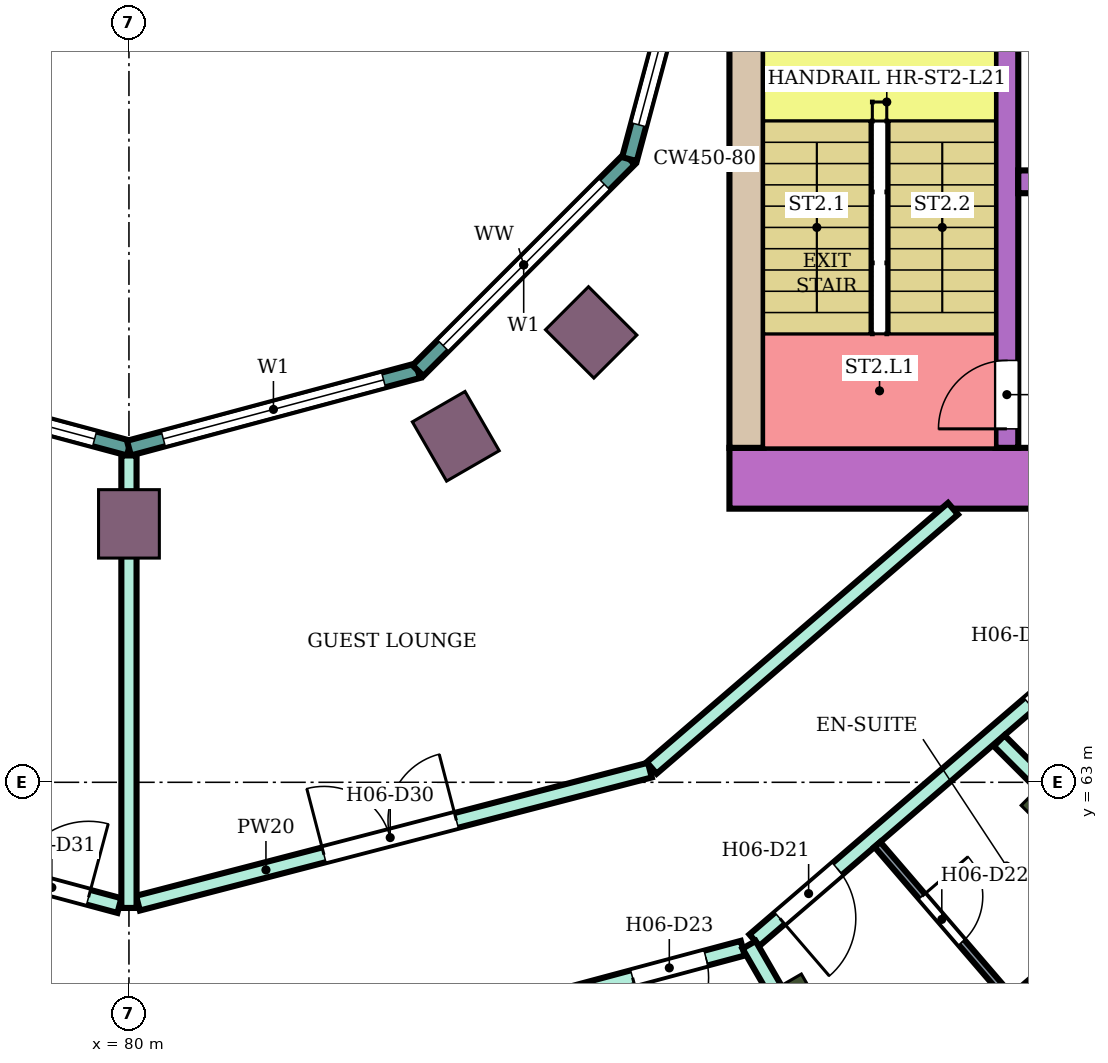
"""IFC4 building model, lengths in metres.
Left out: names, types, materials, properties, quantities, classifications, styles, units other than length and angle.
Written with IfcOpenShell. Run it as: python <this file> out.ifc"""

import sys

from ifc_helpers import new_model, si_unit, direction, frame, frame_2d, origin, origin_2d, place, context, subcontext, project, spatial, rectangle, extrude, element, fill, save


model = new_model("IFC4")
c1 = context("Model", 3, precision=1e-05, world=origin(), true_north=direction((0.0, 1.0)))
c2 = subcontext(c1, "Body", "Model", "MODEL_VIEW")
j1 = project(units=[si_unit("LENGTHUNIT", "METRE"), si_unit("PLANEANGLEUNIT", "RADIAN")], contexts=[c1])
p1 = place(None, origin())
s1 = spatial("IfcSite", under=j1, at=p1, CompositionType="ELEMENT")
p2 = place(p1, origin())
s2 = spatial("IfcBuilding", under=s1, at=p2, CompositionType="ELEMENT")
p3 = place(p2, frame((0.0, 0.0, 93.8)))
s3 = spatial("IfcBuildingStorey", under=s2, at=p3, CompositionType="ELEMENT", Elevation=93.8)
for number, where, z_axis, x_axis in (
    (1, (88.8, 59.758, 0.0), (0.0, 0.0, 1.0), (0.5, -0.866, 0.0)),
    (2, (92.445, 62.555, 0.0), (0.0, 0.0, 1.0), (0.707, -0.707, 0.0)),
):
    element("IfcColumn", number, at=place(p3, frame(where, z_axis=z_axis, x_axis=x_axis)), inside=s3, PredefinedType="COLUMN", context=c2, shape_type="SweptSolid", body=[
        extrude(rectangle(XDim=1.2, YDim=0.8, at=origin_2d()), origin(), (0.0, 0.0, 1.0), 3.8),
    ])
for number, where, z_axis, x_axis in (
    (3, (80.0, 66.4, 0.0), (0.0, 0.0, 1.0), (0.0, -1.0, 0.0)),
    (4, (84.3, 67.552, 0.0), (0.0, 0.0, 1.0), (0.5, -0.866, 0.0)),
    (5, (86.081, 68.919, 0.0), (0.0, 0.0, 1.0), (0.707, -0.707, 0.0)),
):
    element("IfcColumn", number, at=place(p3, frame(where, z_axis=z_axis, x_axis=x_axis)), inside=s3, PredefinedType="COLUMN", context=c2, shape_type="SweptSolid", body=[
        extrude(rectangle(XDim=0.9, YDim=0.8, at=origin_2d()), origin(), (0.0, 0.0, 1.0), 3.8),
    ])
p4 = place(p3, frame((87.9, 67.0, 0.0), z_axis=(0.0, 0.0, 1.0), x_axis=(1.0, 0.0, 0.0)))
e6 = element("IfcWall", 6, at=p4, inside=s3, PredefinedType="SHEAR", context=c2, shape_type="SweptSolid", body=[
    extrude(rectangle(XDim=14.7, YDim=0.8, at=frame_2d((7.35, 0.0))), origin(), (0.0, 0.0, 1.0), 3.48),
])
p5 = place(p4, frame((4.2, 0.0, 0.0)))
e7 = element("IfcOpeningElement", 7, at=p5, cuts=e6, PredefinedType="OPENING", context=c2, shape_type="SweptSolid", body=[
    extrude(rectangle(XDim=2.4, YDim=2.4, at=frame_2d((1.2, 1.2))), frame((0.0, 0.41, 0.0), z_axis=(0.0, -1.0, 0.0), x_axis=(1.0, 0.0, 0.0)), (0.0, 0.0, 1.0), 0.82),
])
p6 = place(p3, frame((88.125, 67.4, 0.0), z_axis=(0.0, 0.0, 1.0), x_axis=(0.0, 1.0, 0.0)))
e8 = element("IfcWall", 8, at=p6, inside=s3, PredefinedType="SHEAR", context=c2, shape_type="SweptSolid", body=[
    extrude(rectangle(XDim=7.6, YDim=0.45, at=frame_2d((3.8, 0.0))), origin(), (0.0, 0.0, 1.0), 3.48),
])
p7 = place(p3, frame((91.55, 67.4, 0.0), z_axis=(0.0, 0.0, 1.0), x_axis=(0.0, 1.0, 0.0)))
e9 = element("IfcWall", 9, at=p7, inside=s3, PredefinedType="SHEAR", context=c2, shape_type="SweptSolid", body=[
    extrude(rectangle(XDim=7.6, YDim=0.3, at=frame_2d((3.8, 0.0))), origin(), (0.0, 0.0, 1.0), 3.48),
])
p8 = place(p7, frame((0.25, 0.0, 0.0)))
e10 = element("IfcOpeningElement", 10, at=p8, cuts=e9, PredefinedType="OPENING", context=c2, shape_type="SweptSolid", body=[
    extrude(rectangle(XDim=0.9, YDim=2.1, at=frame_2d((0.45, 1.05))), frame((0.0, 0.16, 0.0), z_axis=(0.0, -1.0, 0.0), x_axis=(1.0, 0.0, 0.0)), (0.0, 0.0, 1.0), 0.32),
])
p9 = place(p3, frame((91.7, 70.9, 0.0), z_axis=(0.0, 0.0, 1.0), x_axis=(1.0, 0.0, 0.0)))
e11 = element("IfcWall", 11, at=p9, inside=s3, PredefinedType="SHEAR", context=c2, shape_type="SweptSolid", body=[
    extrude(rectangle(XDim=10.9, YDim=0.3, at=frame_2d((5.45, 0.0))), origin(), (0.0, 0.0, 1.0), 3.48),
])
p10 = place(p9, frame((0.4, 0.0, 0.0)))
e12 = element("IfcOpeningElement", 12, at=p10, cuts=e11, PredefinedType="OPENING", context=c2, shape_type="SweptSolid", body=[
    extrude(rectangle(XDim=1.4, YDim=2.1, at=frame_2d((0.7, 1.05))), frame((0.0, 0.16, 0.0), z_axis=(0.0, -1.0, 0.0), x_axis=(1.0, 0.0, 0.0)), (0.0, 0.0, 1.0), 0.32),
])
p11 = place(p9, frame((5.4, 0.0, 0.0)))
e13 = element("IfcOpeningElement", 13, at=p11, cuts=e11, PredefinedType="OPENING", context=c2, shape_type="SweptSolid", body=[
    extrude(rectangle(XDim=1.4, YDim=2.1, at=frame_2d((0.7, 1.05))), frame((0.0, 0.16, 0.0), z_axis=(0.0, -1.0, 0.0), x_axis=(1.0, 0.0, 0.0)), (0.0, 0.0, 1.0), 0.32),
])
p12 = place(p9, frame((8.1, 0.0, 0.0)))
e14 = element("IfcOpeningElement", 14, at=p12, cuts=e11, PredefinedType="OPENING", context=c2, shape_type="SweptSolid", body=[
    extrude(rectangle(XDim=1.0, YDim=2.1, at=frame_2d((0.5, 1.05))), frame((0.0, 0.16, 0.0), z_axis=(0.0, -1.0, 0.0), x_axis=(1.0, 0.0, 0.0)), (0.0, 0.0, 1.0), 0.32),
])
p13 = place(p3, frame((76.198, 68.415, 0.0), z_axis=(0.0, 0.0, 1.0), x_axis=(0.965933654434, -0.258789828301, 0.0)))
e15 = element("IfcWall", 15, at=p13, inside=s3, PredefinedType="NOTDEFINED", context=c2, shape_type="SweptSolid", body=[
    extrude(rectangle(XDim=3.936, YDim=0.2, at=frame_2d((1.968, 0.0))), origin(), (0.0, 0.0, 1.0), 3.8),
])
p14 = place(p13, frame((0.468, 0.0, 0.9)))
e16 = element("IfcOpeningElement", 16, at=p14, cuts=e15, PredefinedType="OPENING", context=c2, shape_type="SweptSolid", body=[
    extrude(rectangle(XDim=3.0, YDim=2.3, at=frame_2d((1.5, 1.15))), frame((0.0, 0.11, 0.0), z_axis=(0.0, -1.0, 0.0), x_axis=(1.0, 0.0, 0.0)), (0.0, 0.0, 1.0), 0.22),
])
p15 = place(p3, frame((80.0, 67.396, 0.0), z_axis=(0.0, 0.0, 1.0), x_axis=(0.965933654434, 0.258789828301, 0.0)))
e17 = element("IfcWall", 17, at=p15, inside=s3, PredefinedType="NOTDEFINED", context=c2, shape_type="SweptSolid", body=[
    extrude(rectangle(XDim=3.936, YDim=0.2, at=frame_2d((1.968, 0.0))), origin(), (0.0, 0.0, 1.0), 3.8),
])
p16 = place(p15, frame((0.468, 0.0, 0.9)))
e18 = element("IfcOpeningElement", 18, at=p16, cuts=e17, PredefinedType="OPENING", context=c2, shape_type="SweptSolid", body=[
    extrude(rectangle(XDim=3.0, YDim=2.3, at=frame_2d((1.5, 1.15))), frame((0.0, 0.11, 0.0), z_axis=(0.0, -1.0, 0.0), x_axis=(1.0, 0.0, 0.0)), (0.0, 0.0, 1.0), 0.22),
])
p17 = place(p3, frame((83.802, 68.415, 0.0), z_axis=(0.0, 0.0, 1.0), x_axis=(0.707106781187, 0.707106781187, 0.0)))
e19 = element("IfcWall", 19, at=p17, inside=s3, PredefinedType="NOTDEFINED", context=c2, shape_type="SweptSolid", body=[
    extrude(rectangle(XDim=3.936, YDim=0.2, at=frame_2d((1.968, 0.0))), origin(), (0.0, 0.0, 1.0), 3.8),
])
p18 = place(p17, frame((0.468, 0.0, 0.9)))
e20 = element("IfcOpeningElement", 20, at=p18, cuts=e19, PredefinedType="OPENING", context=c2, shape_type="SweptSolid", body=[
    extrude(rectangle(XDim=3.0, YDim=2.3, at=frame_2d((1.5, 1.15))), frame((0.0, 0.11, 0.0), z_axis=(0.0, -1.0, 0.0), x_axis=(1.0, 0.0, 0.0)), (0.0, 0.0, 1.0), 0.22),
])
p19 = place(p3, frame((86.585, 71.198, 0.0), z_axis=(0.0, 0.0, 1.0), x_axis=(0.258789828301, 0.965933654434, 0.0)))
e21 = element("IfcWall", 21, at=p19, inside=s3, PredefinedType="NOTDEFINED", context=c2, shape_type="SweptSolid", body=[
    extrude(rectangle(XDim=3.936, YDim=0.2, at=frame_2d((1.968, 0.0))), origin(), (0.0, 0.0, 1.0), 3.8),
])
p20 = place(p19, frame((0.468, 0.0, 0.9)))
e22 = element("IfcOpeningElement", 22, at=p20, cuts=e21, PredefinedType="OPENING", context=c2, shape_type="SweptSolid", body=[
    extrude(rectangle(XDim=3.0, YDim=2.3, at=frame_2d((1.5, 1.15))), frame((0.0, 0.11, 0.0), z_axis=(0.0, -1.0, 0.0), x_axis=(1.0, 0.0, 0.0)), (0.0, 0.0, 1.0), 0.22),
])
p21 = place(p3, frame((71.877, 60.831, 0.0), z_axis=(0.0, 0.0, 1.0), x_axis=(0.965905026676, -0.258896657842, 0.0)))
e23 = element("IfcWall", 23, at=p21, inside=s3, PredefinedType="PARTITIONING", context=c2, shape_type="SweptSolid", body=[
    extrude(rectangle(XDim=8.36, YDim=0.2, at=frame_2d((4.18, 0.0))), origin(), (0.0, 0.0, 1.0), 3.35),
])
p22 = place(p21, frame((4.655, 0.0, 0.0)))
e24 = element("IfcOpeningElement", 24, at=p22, cuts=e23, PredefinedType="OPENING", context=c2, shape_type="SweptSolid", body=[
    extrude(rectangle(XDim=1.8, YDim=2.1, at=frame_2d((0.9, 1.05))), frame((0.0, 0.11, 0.0), z_axis=(0.0, -1.0, 0.0), x_axis=(1.0, 0.0, 0.0)), (0.0, 0.0, 1.0), 0.22),
])
p23 = place(p3, frame((73.297, 63.143, 0.0), z_axis=(0.0, 0.0, 1.0), x_axis=(0.965859030528, -0.25906820173, 0.0)))
e25 = element("IfcWall", 25, at=p23, inside=s3, PredefinedType="PARTITIONING", context=c2, shape_type="SweptSolid", body=[
    extrude(rectangle(XDim=6.81, YDim=0.2, at=frame_2d((3.405, 0.0))), origin(), (0.0, 0.0, 1.0), 3.35),
])
p24 = place(p23, frame((5.39, 0.0, 0.0)))
e26 = element("IfcOpeningElement", 26, at=p24, cuts=e25, PredefinedType="OPENING", context=c2, shape_type="SweptSolid", body=[
    extrude(rectangle(XDim=1.0, YDim=2.1, at=frame_2d((0.5, 1.05))), frame((0.0, 0.11, 0.0), z_axis=(0.0, -1.0, 0.0), x_axis=(1.0, 0.0, 0.0)), (0.0, 0.0, 1.0), 0.22),
])
p25 = place(p3, frame((80.119, 61.41, 0.0), z_axis=(0.0, 0.0, 1.0), x_axis=(0.967823361235, 0.251630565408, 0.0)))
e27 = element("IfcWall", 27, at=p25, inside=s3, PredefinedType="PARTITIONING", context=c2, shape_type="SweptSolid", body=[
    extrude(rectangle(XDim=6.958, YDim=0.2, at=frame_2d((3.479, 0.0))), origin(), (0.0, 0.0, 1.0), 3.35),
])
p26 = place(p25, frame((2.529, 0.0, 0.0)))
e28 = element("IfcOpeningElement", 28, at=p26, cuts=e27, PredefinedType="OPENING", context=c2, shape_type="SweptSolid", body=[
    extrude(rectangle(XDim=1.8, YDim=2.1, at=frame_2d((0.9, 1.05))), frame((0.0, 0.11, 0.0), z_axis=(0.0, -1.0, 0.0), x_axis=(1.0, 0.0, 0.0)), (0.0, 0.0, 1.0), 0.22),
])
p27 = place(p3, frame((80.0, 58.655, 0.0), z_axis=(0.0, 0.0, 1.0), x_axis=(0.965967338894, 0.258664068224, 0.0)))
e29 = element("IfcWall", 29, at=p27, inside=s3, PredefinedType="PARTITIONING", context=c2, shape_type="SweptSolid", body=[
    extrude(rectangle(XDim=8.36, YDim=0.2, at=frame_2d((4.18, 0.0))), origin(), (0.0, 0.0, 1.0), 3.35),
])
p28 = place(p27, frame((6.86, 0.0, 0.0)))
e30 = element("IfcOpeningElement", 30, at=p28, cuts=e29, PredefinedType="OPENING", context=c2, shape_type="SweptSolid", body=[
    extrude(rectangle(XDim=1.0, YDim=2.1, at=frame_2d((0.5, 1.05))), frame((0.0, 0.11, 0.0), z_axis=(0.0, -1.0, 0.0), x_axis=(1.0, 0.0, 0.0)), (0.0, 0.0, 1.0), 0.22),
])
p29 = place(p3, frame((80.0, 61.347, 0.0), z_axis=(0.0, 0.0, 1.0), x_axis=(0.0, 1.0, 0.0)))
e31 = element("IfcWall", 31, at=p29, inside=s3, PredefinedType="PARTITIONING", context=c2, shape_type="SweptSolid", body=[
    extrude(rectangle(XDim=5.953, YDim=0.2, at=frame_2d((2.977, 0.0))), origin(), (0.0, 0.0, 1.0), 3.35),
])
p30 = place(p3, frame((86.877, 63.189, 0.0), z_axis=(0.0, 0.0, 1.0), x_axis=(0.758088707506, 0.652151448325, 0.0)))
e32 = element("IfcWall", 32, at=p30, inside=s3, PredefinedType="PARTITIONING", context=c2, shape_type="SweptSolid", body=[
    extrude(rectangle(XDim=5.229, YDim=0.2, at=frame_2d((2.615, 0.0))), origin(), (0.0, 0.0, 1.0), 3.35),
])
p31 = place(p3, frame((88.229, 60.923, 0.0), z_axis=(0.0, 0.0, 1.0), x_axis=(0.758220952094, 0.651997690031, 0.0)))
e33 = element("IfcWall", 33, at=p31, inside=s3, PredefinedType="PARTITIONING", context=c2, shape_type="SweptSolid", body=[
    extrude(rectangle(XDim=6.346, YDim=0.2, at=frame_2d((3.173, 0.0))), origin(), (0.0, 0.0, 1.0), 3.35),
])
p32 = place(p31, frame((4.767, 0.0, 0.0)))
e34 = element("IfcOpeningElement", 34, at=p32, cuts=e33, PredefinedType="OPENING", context=c2, shape_type="SweptSolid", body=[
    extrude(rectangle(XDim=1.0, YDim=2.1, at=frame_2d((0.5, 1.05))), frame((0.0, 0.11, 0.0), z_axis=(0.0, -1.0, 0.0), x_axis=(1.0, 0.0, 0.0)), (0.0, 0.0, 1.0), 0.22),
])
p33 = place(p31, frame((0.44, 0.0, 0.0)))
e35 = element("IfcOpeningElement", 35, at=p33, cuts=e33, PredefinedType="OPENING", context=c2, shape_type="SweptSolid", body=[
    extrude(rectangle(XDim=1.0, YDim=2.1, at=frame_2d((0.5, 1.05))), frame((0.0, 0.11, 0.0), z_axis=(0.0, -1.0, 0.0), x_axis=(1.0, 0.0, 0.0)), (0.0, 0.0, 1.0), 0.22),
])
p34 = place(p3, frame((88.158, 60.862, 0.0), z_axis=(0.0, 0.0, 1.0), x_axis=(0.499916512745, -0.866073599808, 0.0)))
e36 = element("IfcWall", 36, at=p34, inside=s3, PredefinedType="PARTITIONING", context=c2, shape_type="SweptSolid", body=[
    extrude(rectangle(XDim=9.475, YDim=0.2, at=frame_2d((4.737, 0.0))), origin(), (0.0, 0.0, 1.0), 3.35),
])
p35 = place(p3, frame((91.448, 63.547, 0.0), z_axis=(0.0, 0.0, 1.0), x_axis=(0.706949958062, -0.707263569538, 0.0)))
e37 = element("IfcWall", 37, at=p35, inside=s3, PredefinedType="PARTITIONING", context=c2, shape_type="SweptSolid", body=[
    extrude(rectangle(XDim=7.006, YDim=0.2, at=frame_2d((3.503, 0.0))), origin(), (0.0, 0.0, 1.0), 3.35),
])
p36 = place(p3, frame((89.846, 62.182, 0.0), z_axis=(0.0, 0.0, 1.0), x_axis=(0.652095405055, -0.758136915541, 0.0)))
e38 = element("IfcWall", 38, at=p36, inside=s3, PredefinedType="PARTITIONING", context=c2, shape_type="SweptSolid", body=[
    extrude(rectangle(XDim=2.65, YDim=0.1, at=frame_2d((1.325, 0.0))), origin(), (0.0, 0.0, 1.0), 3.35),
])
p37 = place(p36, frame((0.9, 0.0, 0.0)))
e39 = element("IfcOpeningElement", 39, at=p37, cuts=e38, PredefinedType="OPENING", context=c2, shape_type="SweptSolid", body=[
    extrude(rectangle(XDim=0.8, YDim=2.1, at=frame_2d((0.4, 1.05))), frame((0.0, 0.06, 0.0), z_axis=(0.0, -1.0, 0.0), x_axis=(1.0, 0.0, 0.0)), (0.0, 0.0, 1.0), 0.12),
])
p38 = place(p3, frame((91.607, 60.135, 0.0), z_axis=(0.0, 0.0, 1.0), x_axis=(0.758135842672, 0.652096652388, 0.0)))
e40 = element("IfcWall", 40, at=p38, inside=s3, PredefinedType="PARTITIONING", context=c2, shape_type="SweptSolid", body=[
    extrude(rectangle(XDim=2.201, YDim=0.1, at=frame_2d((1.101, 0.0))), origin(), (0.0, 0.0, 1.0), 3.35),
])
p39 = place(p14, origin())
e41 = element("IfcWindow", 41, at=p39, inside=s3, PartitioningType="SINGLE_PANEL", PredefinedType="WINDOW", context=c2, shape_type="SweptSolid", body=[
    extrude(rectangle(XDim=3.0, YDim=2.3, at=frame_2d((1.5, 1.15))), frame((0.0, 0.03, 0.0), z_axis=(0.0, -1.0, 0.0), x_axis=(1.0, 0.0, 0.0)), (0.0, 0.0, 1.0), 0.06),
])
fill(e16, e41)
p40 = place(p16, origin())
e42 = element("IfcWindow", 42, at=p40, inside=s3, PartitioningType="SINGLE_PANEL", PredefinedType="WINDOW", context=c2, shape_type="SweptSolid", body=[
    extrude(rectangle(XDim=3.0, YDim=2.3, at=frame_2d((1.5, 1.15))), frame((0.0, 0.03, 0.0), z_axis=(0.0, -1.0, 0.0), x_axis=(1.0, 0.0, 0.0)), (0.0, 0.0, 1.0), 0.06),
])
fill(e18, e42)
p41 = place(p18, origin())
e43 = element("IfcWindow", 43, at=p41, inside=s3, PartitioningType="SINGLE_PANEL", PredefinedType="WINDOW", context=c2, shape_type="SweptSolid", body=[
    extrude(rectangle(XDim=3.0, YDim=2.3, at=frame_2d((1.5, 1.15))), frame((0.0, 0.03, 0.0), z_axis=(0.0, -1.0, 0.0), x_axis=(1.0, 0.0, 0.0)), (0.0, 0.0, 1.0), 0.06),
])
fill(e20, e43)
p42 = place(p20, origin())
e44 = element("IfcWindow", 44, at=p42, inside=s3, PartitioningType="SINGLE_PANEL", PredefinedType="WINDOW", context=c2, shape_type="SweptSolid", body=[
    extrude(rectangle(XDim=3.0, YDim=2.3, at=frame_2d((1.5, 1.15))), frame((0.0, 0.03, 0.0), z_axis=(0.0, -1.0, 0.0), x_axis=(1.0, 0.0, 0.0)), (0.0, 0.0, 1.0), 0.06),
])
fill(e22, e44)
p43 = place(p32, frame((1.0, 0.0, 0.0), z_axis=(0.0, 0.0, 1.0), x_axis=(-1.0, 0.0, 0.0)))
e45 = element("IfcDoor", 45, at=p43, inside=s3, OperationType="SINGLE_SWING_RIGHT", PredefinedType="DOOR", context=c2, shape_type="SweptSolid", body=[
    extrude(rectangle(XDim=1.0, YDim=2.1, at=frame_2d((0.5, 1.05))), frame((0.0, 0.025, 0.0), z_axis=(0.0, -1.0, 0.0), x_axis=(1.0, 0.0, 0.0)), (0.0, 0.0, 1.0), 0.05),
])
fill(e34, e45)
p44 = place(p33, frame((1.0, 0.0, 0.0), z_axis=(0.0, 0.0, 1.0), x_axis=(-1.0, 0.0, 0.0)))
e46 = element("IfcDoor", 46, at=p44, inside=s3, OperationType="SINGLE_SWING_RIGHT", PredefinedType="DOOR", context=c2, shape_type="SweptSolid", body=[
    extrude(rectangle(XDim=1.0, YDim=2.1, at=frame_2d((0.5, 1.05))), frame((0.0, 0.025, 0.0), z_axis=(0.0, -1.0, 0.0), x_axis=(1.0, 0.0, 0.0)), (0.0, 0.0, 1.0), 0.05),
])
fill(e35, e46)
p45 = place(p37, origin())
e47 = element("IfcDoor", 47, at=p45, inside=s3, OperationType="SINGLE_SWING_LEFT", PredefinedType="DOOR", context=c2, shape_type="SweptSolid", body=[
    extrude(rectangle(XDim=0.8, YDim=2.1, at=frame_2d((0.4, 1.05))), frame((0.0, 0.025, 0.0), z_axis=(0.0, -1.0, 0.0), x_axis=(1.0, 0.0, 0.0)), (0.0, 0.0, 1.0), 0.05),
])
fill(e39, e47)
p46 = place(p28, frame((1.0, 0.0, 0.0), z_axis=(0.0, 0.0, 1.0), x_axis=(-1.0, 0.0, 0.0)))
e48 = element("IfcDoor", 48, at=p46, inside=s3, OperationType="SINGLE_SWING_RIGHT", PredefinedType="DOOR", context=c2, shape_type="SweptSolid", body=[
    extrude(rectangle(XDim=1.0, YDim=2.1, at=frame_2d((0.5, 1.05))), frame((0.0, 0.025, 0.0), z_axis=(0.0, -1.0, 0.0), x_axis=(1.0, 0.0, 0.0)), (0.0, 0.0, 1.0), 0.05),
])
fill(e30, e48)
p47 = place(p26, origin())
e49 = element("IfcDoor", 49, at=p47, inside=s3, OperationType="DOUBLE_DOOR_SINGLE_SWING", PredefinedType="DOOR", context=c2, shape_type="SweptSolid", body=[
    extrude(rectangle(XDim=1.8, YDim=2.1, at=frame_2d((0.9, 1.05))), frame((0.0, 0.025, 0.0), z_axis=(0.0, -1.0, 0.0), x_axis=(1.0, 0.0, 0.0)), (0.0, 0.0, 1.0), 0.05),
])
fill(e28, e49)
p48 = place(p24, origin())
e50 = element("IfcDoor", 50, at=p48, inside=s3, OperationType="SINGLE_SWING_RIGHT", PredefinedType="DOOR", context=c2, shape_type="SweptSolid", body=[
    extrude(rectangle(XDim=1.0, YDim=2.1, at=frame_2d((0.5, 1.05))), frame((0.0, 0.025, 0.0), z_axis=(0.0, -1.0, 0.0), x_axis=(1.0, 0.0, 0.0)), (0.0, 0.0, 1.0), 0.05),
])
fill(e26, e50)
p49 = place(p8, origin())
e51 = element("IfcDoor", 51, at=p49, inside=s3, OperationType="SINGLE_SWING_LEFT", PredefinedType="DOOR", context=c2, shape_type="SweptSolid", body=[
    extrude(rectangle(XDim=0.9, YDim=2.1, at=frame_2d((0.45, 1.05))), frame((0.0, 0.025, 0.0), z_axis=(0.0, -1.0, 0.0), x_axis=(1.0, 0.0, 0.0)), (0.0, 0.0, 1.0), 0.05),
])
fill(e10, e51)
save(model, sys.argv[1])
